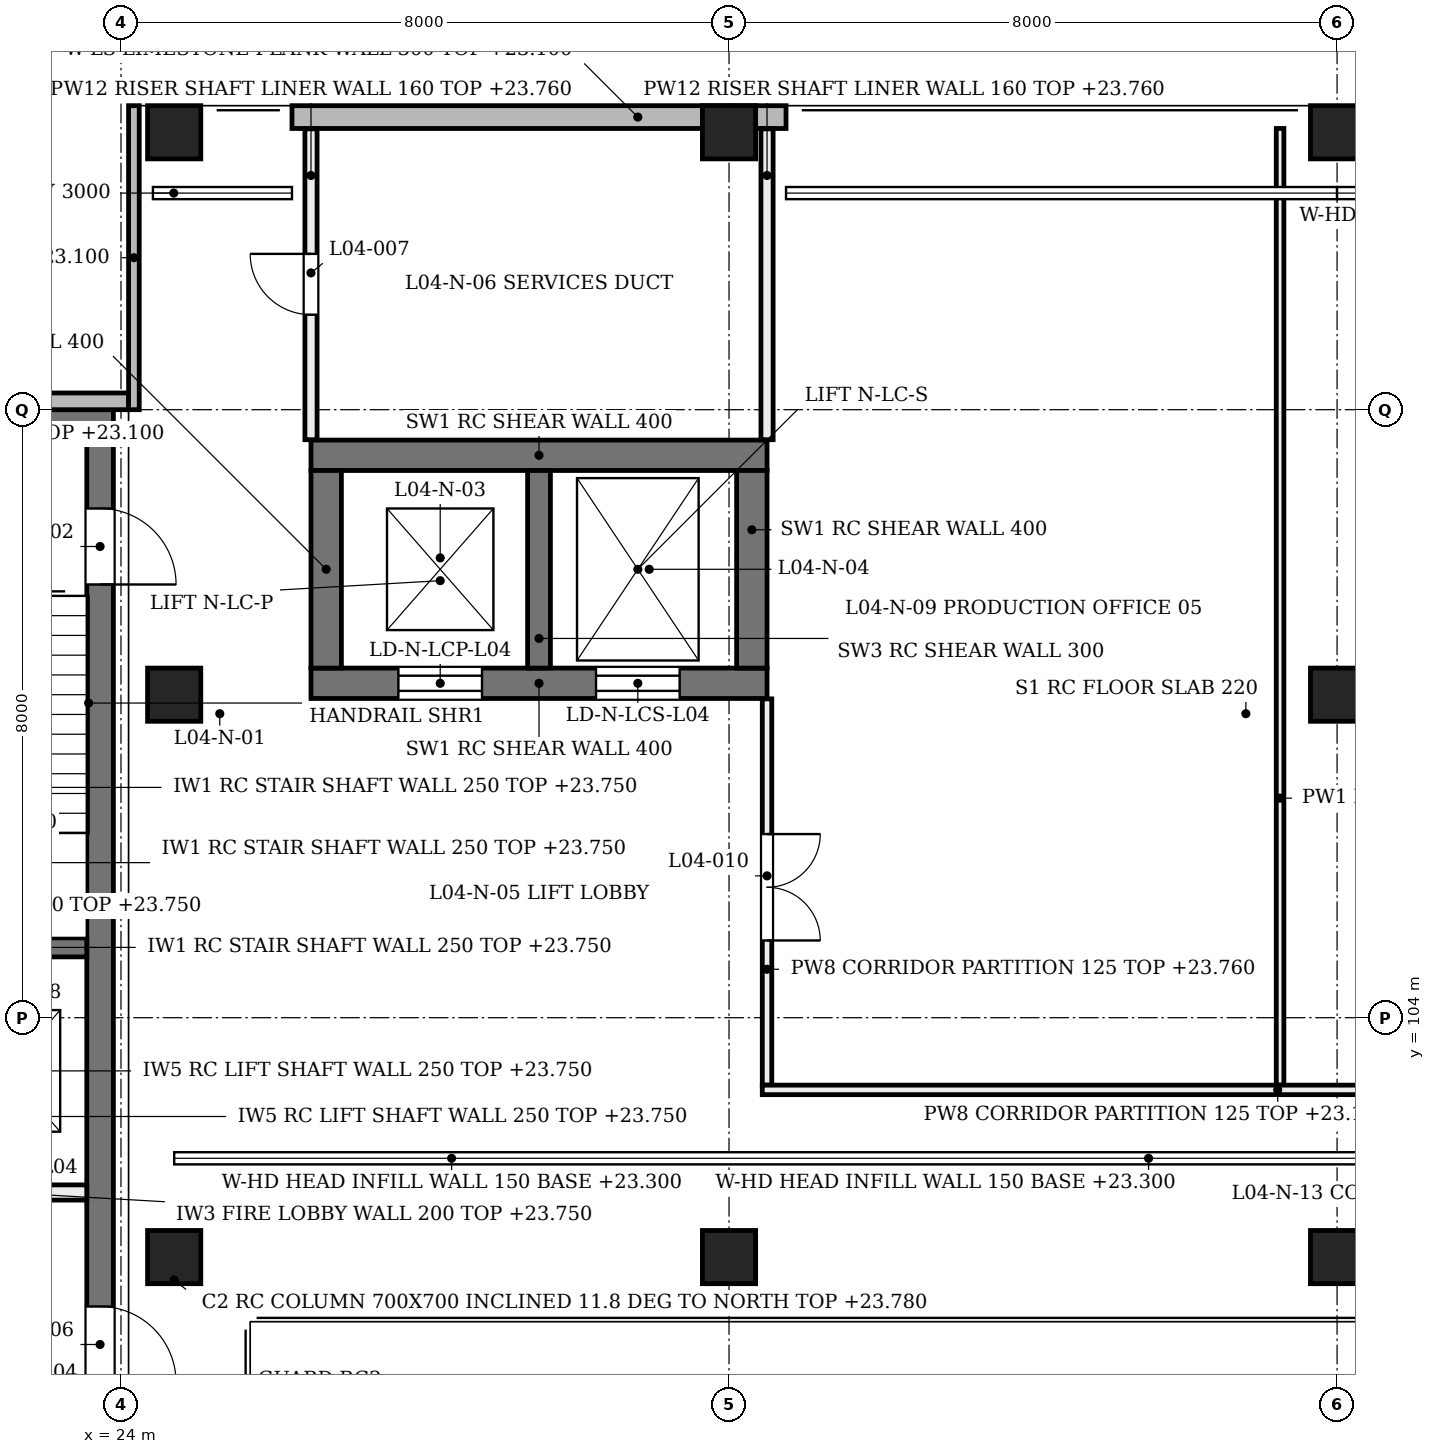
"""IFC4 building model, lengths in metres.
Left out: names, types, materials, properties, quantities, classifications, styles, units other than length and angle.
Written with IfcOpenShell. Run it as: python <this file> out.ifc"""

import sys

from ifc_helpers import new_model, si_unit, direction, frame, frame_2d, origin, origin_2d, place, context, subcontext, project, spatial, rectangle, extrude, element, fill, save


model = new_model("IFC4")
c1 = context("Model", 3, precision=1e-05, world=origin(), true_north=direction((0.0, 1.0)))
c2 = subcontext(c1, "Body", "Model", "MODEL_VIEW")
j1 = project(units=[si_unit("LENGTHUNIT", "METRE"), si_unit("PLANEANGLEUNIT", "RADIAN")], contexts=[c1])
p1 = place(None, origin())
s1 = spatial("IfcSite", under=j1, at=p1, CompositionType="ELEMENT")
p2 = place(p1, origin())
s2 = spatial("IfcBuilding", under=s1, at=p2, CompositionType="ELEMENT")
p3 = place(p2, frame((0.0, 0.0, 19.2)))
s3 = spatial("IfcBuildingStorey", under=s2, at=p3, CompositionType="ELEMENT", Elevation=19.2)
p4 = place(p3, frame((26.5, 108.4, 0.0), z_axis=(0.0, 0.0, 1.0), x_axis=(1.0, 0.0, 0.0)))
e1 = element("IfcWall", 1, at=p4, inside=s3, PredefinedType="SHEAR", context=c2, shape_type="SweptSolid", body=[
    extrude(rectangle(XDim=6.0, YDim=0.4, at=frame_2d((3.0, 0.0))), origin(), (0.0, 0.0, 1.0), 4.58),
])
p5 = place(p4, frame((1.15, 0.0, 0.0)))
e2 = element("IfcOpeningElement", 2, at=p5, cuts=e1, PredefinedType="OPENING", context=c2, shape_type="SweptSolid", body=[
    extrude(rectangle(XDim=1.1, YDim=2.1, at=frame_2d((0.55, 1.05))), frame((0.0, 0.21, 0.0), z_axis=(0.0, -1.0, 0.0), x_axis=(1.0, 0.0, 0.0)), (0.0, 0.0, 1.0), 0.42),
])
p6 = place(p4, frame((3.75, 0.0, 0.0)))
e3 = element("IfcOpeningElement", 3, at=p6, cuts=e1, PredefinedType="OPENING", context=c2, shape_type="SweptSolid", body=[
    extrude(rectangle(XDim=1.1, YDim=2.1, at=frame_2d((0.55, 1.05))), frame((0.0, 0.21, 0.0), z_axis=(0.0, -1.0, 0.0), x_axis=(1.0, 0.0, 0.0)), (0.0, 0.0, 1.0), 0.42),
])
p7 = place(p3, frame((26.5, 111.4, 0.0), z_axis=(0.0, 0.0, 1.0), x_axis=(1.0, 0.0, 0.0)))
e4 = element("IfcWall", 4, at=p7, inside=s3, PredefinedType="SHEAR", context=c2, shape_type="SweptSolid", body=[
    extrude(rectangle(XDim=6.0, YDim=0.4, at=frame_2d((3.0, 0.0))), origin(), (0.0, 0.0, 1.0), 4.58),
])
for number, where, z_axis, x_axis in (
    (5, (26.7, 108.6, 0.0), (0.0, 0.0, 1.0), (0.0, 1.0, 0.0)),
    (6, (32.3, 108.6, 0.0), (0.0, 0.0, 1.0), (0.0, 1.0, 0.0)),
):
    element("IfcWall", number, at=place(p3, frame(where, z_axis=z_axis, x_axis=x_axis)), inside=s3, PredefinedType="SHEAR", context=c2, shape_type="SweptSolid", body=[
        extrude(rectangle(XDim=2.6, YDim=0.4, at=frame_2d((1.3, 0.0))), origin(), (0.0, 0.0, 1.0), 4.58),
    ])
p8 = place(p3, frame((29.5, 108.6, 0.0), z_axis=(0.0, 0.0, 1.0), x_axis=(0.0, 1.0, 0.0)))
e7 = element("IfcWall", 7, at=p8, inside=s3, PredefinedType="SHEAR", context=c2, shape_type="SweptSolid", body=[
    extrude(rectangle(XDim=2.6, YDim=0.3, at=frame_2d((1.3, 0.0))), origin(), (0.0, 0.0, 1.0), 4.58),
])
p9 = place(p3, frame((15.95, 111.825, 0.0), z_axis=(0.0, 0.0, 1.0), x_axis=(1.0, 0.0, 0.0)))
e8 = element("IfcWall", 8, at=p9, inside=s3, PredefinedType="SHEAR", context=c2, shape_type="SweptSolid", body=[
    extrude(rectangle(XDim=7.95, YDim=0.35, at=frame_2d((3.975, 0.0))), origin(), (0.0, 0.0, 1.0), 4.58),
])
p10 = place(p3, frame((23.725, 96.45, 0.0), z_axis=(0.0, 0.0, 1.0), x_axis=(0.0, 1.0, 0.0)))
e9 = element("IfcWall", 9, at=p10, inside=s3, PredefinedType="SHEAR", context=c2, shape_type="SweptSolid", body=[
    extrude(rectangle(XDim=15.2, YDim=0.35, at=frame_2d((7.6, 0.0))), origin(), (0.0, 0.0, 1.0), 4.58),
])
p11 = place(p10, frame((13.25, 0.0, 0.0)))
e10 = element("IfcOpeningElement", 10, at=p11, cuts=e9, PredefinedType="OPENING", context=c2, shape_type="SweptSolid", body=[
    extrude(rectangle(XDim=1.0, YDim=2.1, at=frame_2d((0.5, 1.05))), frame((0.0, 0.185, 0.0), z_axis=(0.0, -1.0, 0.0), x_axis=(1.0, 0.0, 0.0)), (0.0, 0.0, 1.0), 0.37),
])
p12 = place(p10, frame((2.75, 0.0, 0.0)))
e11 = element("IfcOpeningElement", 11, at=p12, cuts=e9, PredefinedType="OPENING", context=c2, shape_type="SweptSolid", body=[
    extrude(rectangle(XDim=1.0, YDim=2.1, at=frame_2d((0.5, 1.05))), frame((0.0, 0.185, 0.0), z_axis=(0.0, -1.0, 0.0), x_axis=(1.0, 0.0, 0.0)), (0.0, 0.0, 1.0), 0.37),
])
for number, where, z_axis, x_axis in (
    (12, (24.7, 100.6, 0.0), (0.0, 0.204, 0.979), (-1.0, 0.0, 0.0)),
    (13, (32.0, 100.6, 0.0), (0.0, 0.204, 0.979), (-1.0, 0.0, 0.0)),
    (14, (40.0, 100.6, 0.0), (0.0, 0.204, 0.979), (-1.0, 0.0, 0.0)),
    (15, (24.7, 108.0, 0.0), (0.0, 0.204, 0.979), (-1.0, 0.0, 0.0)),
    (16, (40.0, 108.0, 0.0), (0.0, 0.204, 0.979), (-1.0, 0.0, 0.0)),
    (17, (24.7, 115.4, 0.0), (0.0, 0.204, 0.979), (-1.0, 0.0, 0.0)),
    (18, (32.0, 115.4, 0.0), (0.0, 0.204, 0.979), (-1.0, 0.0, 0.0)),
    (19, (40.0, 115.4, 0.0), (0.0, 0.204, 0.979), (-1.0, 0.0, 0.0)),
):
    element("IfcColumn", number, at=place(p3, frame(where, z_axis=z_axis, x_axis=x_axis)), inside=s3, PredefinedType="COLUMN", context=c2, shape_type="SweptSolid", body=[
        extrude(rectangle(XDim=0.7, YDim=0.7, at=origin_2d()), origin(), (0.0, 0.0, 1.0), 4.678),
    ])
p13 = place(p3, frame((26.25, 115.85, 0.0), z_axis=(0.0, 0.0, 1.0), x_axis=(1.0, 0.0, 0.0)))
e20 = element("IfcWall", 20, at=p13, inside=s3, PredefinedType="SOLIDWALL", context=c2, shape_type="SweptSolid", body=[
    extrude(rectangle(XDim=6.5, YDim=0.3, at=frame_2d((3.25, 0.0))), origin(), (0.0, 0.0, 1.0), 3.9),
])
p14 = place(p3, frame((40.2, 114.85, 4.1), z_axis=(0.0, 0.0, 1.0), x_axis=(1.0, 0.0, 0.0)))
e21 = element("IfcWall", 21, at=p14, inside=s3, PredefinedType="SOLIDWALL", context=c2, shape_type="SweptSolid", body=[
    extrude(rectangle(XDim=7.6, YDim=0.15, at=frame_2d((3.8, 0.0))), origin(), (0.0, 0.0, 1.0), 0.48),
])
p15 = place(p3, frame((24.9, 102.15, 4.1), z_axis=(0.0, 0.0, 1.0), x_axis=(1.0, 0.0, 0.0)))
e22 = element("IfcWall", 22, at=p15, inside=s3, PredefinedType="SOLIDWALL", context=c2, shape_type="SweptSolid", body=[
    extrude(rectangle(XDim=6.9, YDim=0.15, at=frame_2d((3.45, 0.0))), origin(), (0.0, 0.0, 1.0), 0.48),
])
for number, where, z_axis, x_axis in (
    (23, (32.2, 102.15, 4.1), (0.0, 0.0, 1.0), (1.0, 0.0, 0.0)),
    (24, (40.2, 102.15, 4.1), (0.0, 0.0, 1.0), (1.0, 0.0, 0.0)),
):
    element("IfcWall", number, at=place(p3, frame(where, z_axis=z_axis, x_axis=x_axis)), inside=s3, PredefinedType="SOLIDWALL", context=c2, shape_type="SweptSolid", body=[
        extrude(rectangle(XDim=7.6, YDim=0.15, at=frame_2d((3.8, 0.0))), origin(), (0.0, 0.0, 1.0), 0.48),
    ])
p16 = place(p3, frame((15.9, 112.11, 0.0), z_axis=(0.0, 0.0, 1.0), x_axis=(1.0, 0.0, 0.0)))
e25 = element("IfcWall", 25, at=p16, inside=s3, PredefinedType="SOLIDWALL", context=c2, shape_type="SweptSolid", body=[
    extrude(rectangle(XDim=8.2, YDim=0.22, at=frame_2d((4.1, 0.0))), origin(), (0.0, 0.0, 1.0), 3.9),
])
p17 = place(p16, frame((1.108, 0.0, 0.9)))
e26 = element("IfcOpeningElement", 26, at=p17, cuts=e25, PredefinedType="OPENING", context=c2, shape_type="SweptSolid", body=[
    extrude(rectangle(XDim=0.45, YDim=2.6, at=frame_2d((0.225, 1.3))), frame((0.0, 0.12, 0.0), z_axis=(0.0, -1.0, 0.0), x_axis=(1.0, 0.0, 0.0)), (0.0, 0.0, 1.0), 0.24),
])
p18 = place(p16, frame((3.775, 0.0, 0.9)))
e27 = element("IfcOpeningElement", 27, at=p18, cuts=e25, PredefinedType="OPENING", context=c2, shape_type="SweptSolid", body=[
    extrude(rectangle(XDim=0.45, YDim=2.6, at=frame_2d((0.225, 1.3))), frame((0.0, 0.12, 0.0), z_axis=(0.0, -1.0, 0.0), x_axis=(1.0, 0.0, 0.0)), (0.0, 0.0, 1.0), 0.24),
])
p19 = place(p16, frame((6.442, 0.0, 0.9)))
e28 = element("IfcOpeningElement", 28, at=p19, cuts=e25, PredefinedType="OPENING", context=c2, shape_type="SweptSolid", body=[
    extrude(rectangle(XDim=0.45, YDim=2.6, at=frame_2d((0.225, 1.3))), frame((0.0, 0.12, 0.0), z_axis=(0.0, -1.0, 0.0), x_axis=(1.0, 0.0, 0.0)), (0.0, 0.0, 1.0), 0.24),
])
p20 = place(p3, frame((24.17, 112.0, 0.0), z_axis=(0.0, 0.0, 1.0), x_axis=(0.0, 1.0, 0.0)))
e29 = element("IfcWall", 29, at=p20, inside=s3, PredefinedType="SOLIDWALL", context=c2, shape_type="SweptSolid", body=[
    extrude(rectangle(XDim=4.0, YDim=0.14, at=frame_2d((2.0, 0.0))), origin(), (0.0, 0.0, 1.0), 3.9),
])
p21 = place(p3, frame((20.45, 104.925, 0.0), z_axis=(0.0, 0.0, 1.0), x_axis=(1.0, 0.0, 0.0)))
e30 = element("IfcWall", 30, at=p21, inside=s3, PredefinedType="SOLIDWALL", context=c2, shape_type="SweptSolid", body=[
    extrude(rectangle(XDim=3.1, YDim=0.25, at=frame_2d((1.55, 0.0))), origin(), (0.0, 0.0, 1.0), 4.55),
])
p22 = place(p3, frame((16.35, 101.7, 0.0), z_axis=(0.0, 0.0, 1.0), x_axis=(1.0, 0.0, 0.0)))
e31 = element("IfcWall", 31, at=p22, inside=s3, PredefinedType="SOLIDWALL", context=c2, shape_type="SweptSolid", body=[
    extrude(rectangle(XDim=7.2, YDim=0.2, at=frame_2d((3.6, 0.0))), origin(), (0.0, 0.0, 1.0), 4.55),
])
p23 = place(p22, frame((0.5, 0.0, 0.0)))
e32 = element("IfcOpeningElement", 32, at=p23, cuts=e31, PredefinedType="OPENING", context=c2, shape_type="SweptSolid", body=[
    extrude(rectangle(XDim=1.1, YDim=2.1, at=frame_2d((0.55, 1.05))), frame((0.0, 0.11, 0.0), z_axis=(0.0, -1.0, 0.0), x_axis=(1.0, 0.0, 0.0)), (0.0, 0.0, 1.0), 0.22),
])
p24 = place(p22, frame((5.6, 0.0, 0.0)))
e33 = element("IfcOpeningElement", 33, at=p24, cuts=e31, PredefinedType="OPENING", context=c2, shape_type="SweptSolid", body=[
    extrude(rectangle(XDim=1.1, YDim=2.1, at=frame_2d((0.55, 1.05))), frame((0.0, 0.11, 0.0), z_axis=(0.0, -1.0, 0.0), x_axis=(1.0, 0.0, 0.0)), (0.0, 0.0, 1.0), 0.22),
])
p25 = place(p22, frame((3.1, 0.0, 0.0)))
e34 = element("IfcOpeningElement", 34, at=p25, cuts=e31, PredefinedType="OPENING", context=c2, shape_type="SweptSolid", body=[
    extrude(rectangle(XDim=1.0, YDim=2.1, at=frame_2d((0.5, 1.05))), frame((0.0, 0.11, 0.0), z_axis=(0.0, -1.0, 0.0), x_axis=(1.0, 0.0, 0.0)), (0.0, 0.0, 1.0), 0.22),
])
p26 = place(p3, frame((26.5, 111.605, 0.0), z_axis=(0.0, 0.0, 1.0), x_axis=(0.0, 1.0, 0.0)))
e35 = element("IfcWall", 35, at=p26, inside=s3, PredefinedType="PARTITIONING", context=c2, shape_type="SweptSolid", body=[
    extrude(rectangle(XDim=4.09, YDim=0.16, at=frame_2d((2.045, 0.0))), origin(), (0.0, 0.0, 1.0), 4.56),
])
p27 = place(p26, frame((1.645, 0.0, 0.0)))
e36 = element("IfcOpeningElement", 36, at=p27, cuts=e35, PredefinedType="OPENING", context=c2, shape_type="SweptSolid", body=[
    extrude(rectangle(XDim=0.8, YDim=2.1, at=frame_2d((0.4, 1.05))), frame((0.0, 0.09, 0.0), z_axis=(0.0, -1.0, 0.0), x_axis=(1.0, 0.0, 0.0)), (0.0, 0.0, 1.0), 0.18),
])
p28 = place(p3, frame((32.5, 103.113, 0.0), z_axis=(0.0, 0.0, 1.0), x_axis=(0.0, 1.0, 0.0)))
e37 = element("IfcWall", 37, at=p28, inside=s3, PredefinedType="PARTITIONING", context=c2, shape_type="SweptSolid", body=[
    extrude(rectangle(XDim=5.083, YDim=0.125, at=frame_2d((2.541, 0.0))), origin(), (0.0, 0.0, 1.0), 4.56),
])
p29 = place(p28, frame((1.904, 0.0, 0.0)))
e38 = element("IfcOpeningElement", 38, at=p29, cuts=e37, PredefinedType="OPENING", context=c2, shape_type="SweptSolid", body=[
    extrude(rectangle(XDim=1.4, YDim=2.2, at=frame_2d((0.7, 1.1))), frame((0.0, 0.073, 0.0), z_axis=(0.0, -1.0, 0.0), x_axis=(1.0, 0.0, 0.0)), (0.0, 0.0, 1.0), 0.145),
])
p30 = place(p3, frame((32.5, 111.605, 0.0), z_axis=(0.0, 0.0, 1.0), x_axis=(0.0, 1.0, 0.0)))
e39 = element("IfcWall", 39, at=p30, inside=s3, PredefinedType="PARTITIONING", context=c2, shape_type="SweptSolid", body=[
    extrude(rectangle(XDim=4.09, YDim=0.16, at=frame_2d((2.045, 0.0))), origin(), (0.0, 0.0, 1.0), 4.56),
])
p31 = place(p3, frame((39.25, 103.113, 0.0), z_axis=(0.0, 0.0, 1.0), x_axis=(0.0, 1.0, 0.0)))
e40 = element("IfcWall", 40, at=p31, inside=s3, PredefinedType="PARTITIONING", context=c2, shape_type="SweptSolid", body=[
    extrude(rectangle(XDim=12.587, YDim=0.1, at=frame_2d((6.294, 0.0))), origin(), (0.0, 0.0, 1.0), 4.08),
])
p32 = place(p3, frame((32.438, 103.05, 0.0), z_axis=(0.0, 0.0, 1.0), x_axis=(1.0, 0.0, 0.0)))
e41 = element("IfcWall", 41, at=p32, inside=s3, PredefinedType="PARTITIONING", context=c2, shape_type="SweptSolid", body=[
    extrude(rectangle(XDim=13.562, YDim=0.125, at=frame_2d((6.781, 0.0))), origin(), (0.0, 0.0, 1.0), 3.98),
])
p33 = place(p32, frame((9.116, 0.0, 0.0)))
e42 = element("IfcOpeningElement", 42, at=p33, cuts=e41, PredefinedType="OPENING", context=c2, shape_type="SweptSolid", body=[
    extrude(rectangle(XDim=1.4, YDim=2.2, at=frame_2d((0.7, 1.1))), frame((0.0, 0.073, 0.0), z_axis=(0.0, -1.0, 0.0), x_axis=(1.0, 0.0, 0.0)), (0.0, 0.0, 1.0), 0.145),
])
p34 = place(p11, frame((1.0, 0.0, 0.0), z_axis=(0.0, 0.0, 1.0), x_axis=(-1.0, 0.0, 0.0)))
e43 = element("IfcDoor", 43, at=p34, inside=s3, OperationType="SINGLE_SWING_LEFT", PredefinedType="DOOR", context=c2, shape_type="SweptSolid", body=[
    extrude(rectangle(XDim=1.0, YDim=2.1, at=frame_2d((0.5, 1.05))), frame((0.0, 0.025, 0.0), z_axis=(0.0, -1.0, 0.0), x_axis=(1.0, 0.0, 0.0)), (0.0, 0.0, 1.0), 0.05),
])
fill(e10, e43)
p35 = place(p12, frame((1.0, 0.0, 0.0), z_axis=(0.0, 0.0, 1.0), x_axis=(-1.0, 0.0, 0.0)))
e44 = element("IfcDoor", 44, at=p35, inside=s3, OperationType="SINGLE_SWING_LEFT", PredefinedType="DOOR", context=c2, shape_type="SweptSolid", body=[
    extrude(rectangle(XDim=1.0, YDim=2.1, at=frame_2d((0.5, 1.05))), frame((0.0, 0.025, 0.0), z_axis=(0.0, -1.0, 0.0), x_axis=(1.0, 0.0, 0.0)), (0.0, 0.0, 1.0), 0.05),
])
fill(e11, e44)
p36 = place(p5, frame((1.1, 0.0, 0.0), z_axis=(0.0, 0.0, 1.0), x_axis=(-1.0, 0.0, 0.0)))
e45 = element("IfcDoor", 45, at=p36, inside=s3, OperationType="DOUBLE_DOOR_SLIDING", PredefinedType="DOOR", context=c2, shape_type="SweptSolid", body=[
    extrude(rectangle(XDim=1.1, YDim=2.1, at=frame_2d((0.55, 1.05))), frame((0.0, 0.025, 0.0), z_axis=(0.0, -1.0, 0.0), x_axis=(1.0, 0.0, 0.0)), (0.0, 0.0, 1.0), 0.05),
])
fill(e2, e45)
p37 = place(p6, frame((1.1, 0.0, 0.0), z_axis=(0.0, 0.0, 1.0), x_axis=(-1.0, 0.0, 0.0)))
e46 = element("IfcDoor", 46, at=p37, inside=s3, OperationType="DOUBLE_DOOR_SLIDING", PredefinedType="DOOR", context=c2, shape_type="SweptSolid", body=[
    extrude(rectangle(XDim=1.1, YDim=2.1, at=frame_2d((0.55, 1.05))), frame((0.0, 0.025, 0.0), z_axis=(0.0, -1.0, 0.0), x_axis=(1.0, 0.0, 0.0)), (0.0, 0.0, 1.0), 0.05),
])
fill(e3, e46)
p38 = place(p27, frame((0.8, 0.0, 0.0), z_axis=(0.0, 0.0, 1.0), x_axis=(-1.0, 0.0, 0.0)))
e47 = element("IfcDoor", 47, at=p38, inside=s3, OperationType="SINGLE_SWING_RIGHT", PredefinedType="DOOR", context=c2, shape_type="SweptSolid", body=[
    extrude(rectangle(XDim=0.8, YDim=2.1, at=frame_2d((0.4, 1.05))), frame((0.0, 0.025, 0.0), z_axis=(0.0, -1.0, 0.0), x_axis=(1.0, 0.0, 0.0)), (0.0, 0.0, 1.0), 0.05),
])
fill(e36, e47)
p39 = place(p29, frame((1.4, 0.0, 0.0), z_axis=(0.0, 0.0, 1.0), x_axis=(-1.0, 0.0, 0.0)))
e48 = element("IfcDoor", 48, at=p39, inside=s3, OperationType="DOUBLE_DOOR_SINGLE_SWING", PredefinedType="DOOR", context=c2, shape_type="SweptSolid", body=[
    extrude(rectangle(XDim=1.4, YDim=2.2, at=frame_2d((0.7, 1.1))), frame((0.0, 0.025, 0.0), z_axis=(0.0, -1.0, 0.0), x_axis=(1.0, 0.0, 0.0)), (0.0, 0.0, 1.0), 0.05),
])
fill(e38, e48)
save(model, sys.argv[1])
